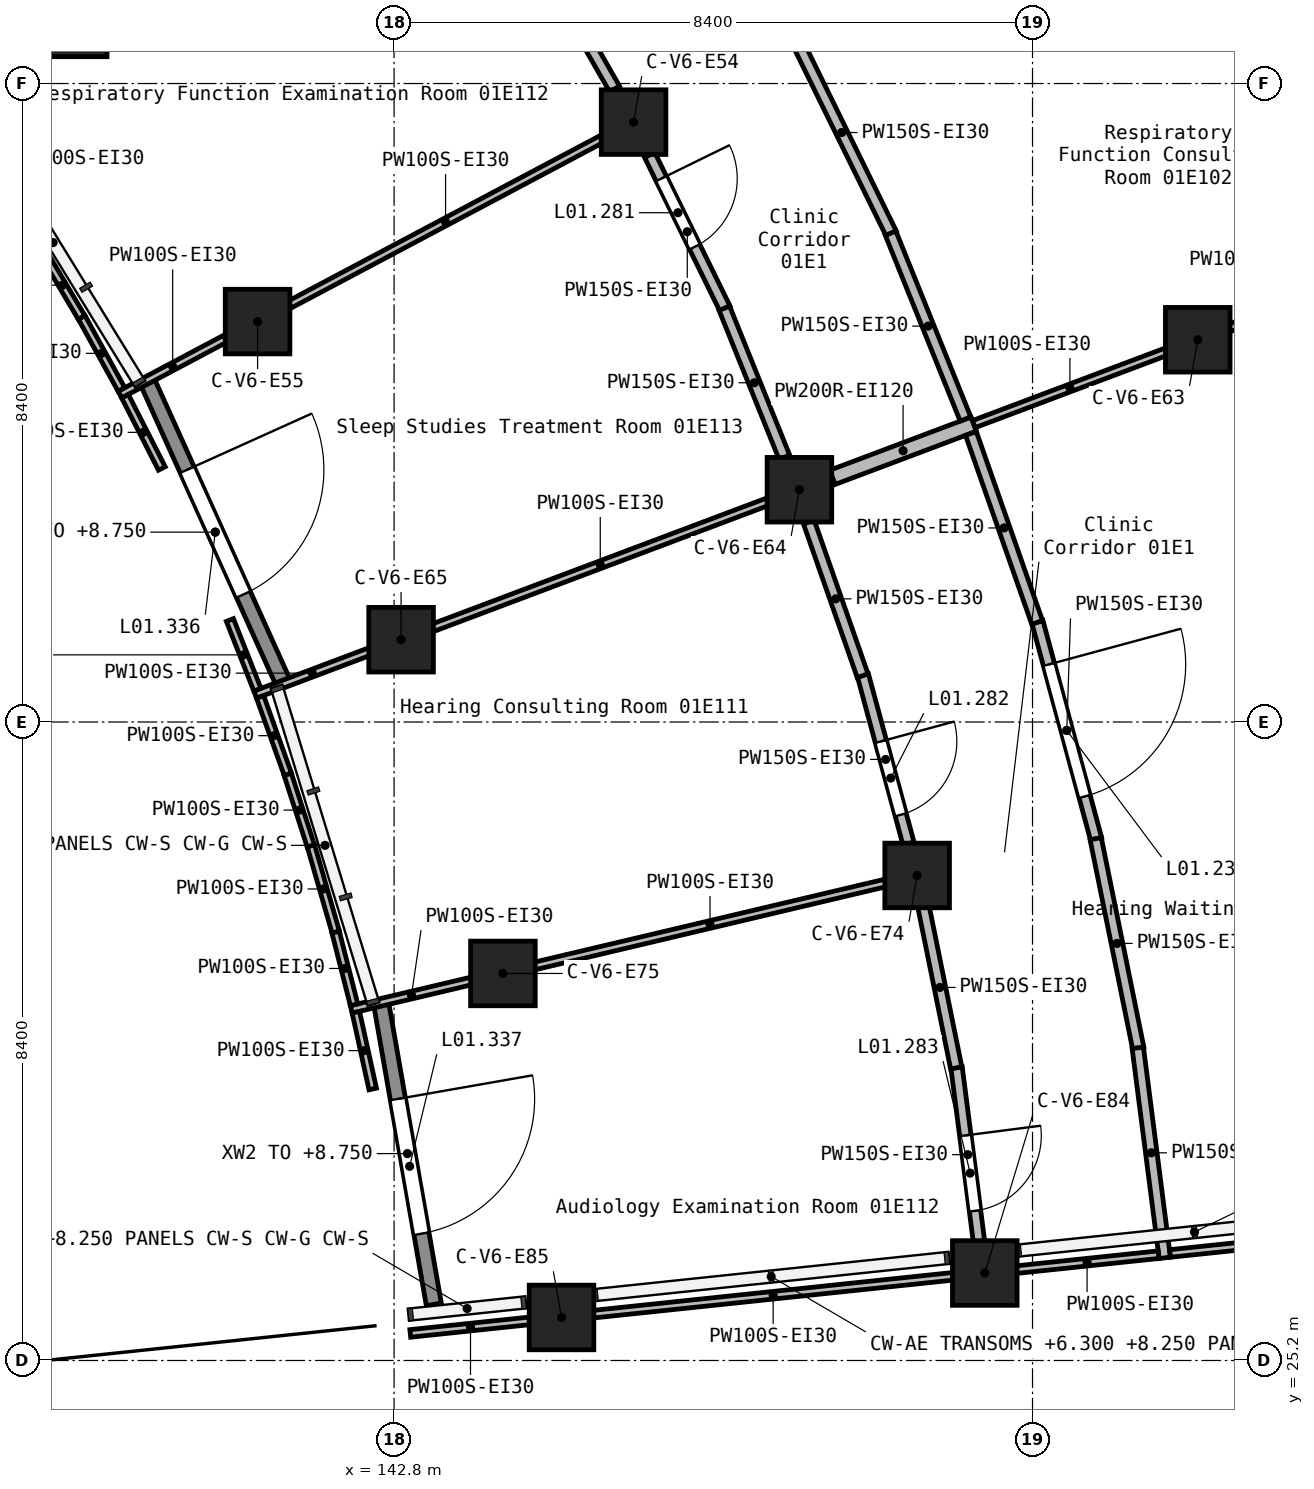
"""IFC4 building model, lengths in metres.
Left out: names, types, materials, properties, quantities, classifications, styles, units other than length and angle.
Written with IfcOpenShell. Run it as: python <this file> out.ifc"""

import sys

from ifc_helpers import new_model, si_unit, direction, frame, frame_2d, origin, origin_2d, place, context, subcontext, project, spatial, rectangle, extrude, element, fill, save


model = new_model("IFC4")
c1 = context("Model", 3, precision=1e-05, world=origin(), true_north=direction((0.0, 1.0)))
c2 = subcontext(c1, "Body", "Model", "MODEL_VIEW")
j1 = project(units=[si_unit("LENGTHUNIT", "METRE"), si_unit("PLANEANGLEUNIT", "RADIAN")], contexts=[c1])
p1 = place(None, origin())
s1 = spatial("IfcSite", under=j1, at=p1, CompositionType="ELEMENT")
p2 = place(p1, origin())
s2 = spatial("IfcBuilding", under=s1, at=p2, CompositionType="ELEMENT")
p3 = place(p2, frame((0.0, 0.0, 5.4)))
s3 = spatial("IfcBuildingStorey", under=s2, at=p3, CompositionType="ELEMENT", Elevation=5.4)
for number, where, z_axis, x_axis in (
    (1, (138.598, 42.778, 0.0), (0.0, 0.0, 1.0), (1.0, 0.0, 0.0)),
    (2, (141.004, 38.868, 0.0), (0.0, 0.0, 1.0), (1.0, 0.0, 0.0)),
    (3, (142.892, 34.683, 0.0), (0.0, 0.0, 1.0), (1.0, 0.0, 0.0)),
    (4, (144.232, 30.292, 0.0), (0.0, 0.0, 1.0), (1.0, 0.0, 0.0)),
    (5, (145.003, 25.766, 0.0), (0.0, 0.0, 1.0), (1.0, 0.0, 0.0)),
    (6, (145.951, 41.492, 0.0), (0.0, 0.0, 1.0), (1.0, 0.0, 0.0)),
    (7, (148.133, 36.656, 0.0), (0.0, 0.0, 1.0), (1.0, 0.0, 0.0)),
    (8, (149.682, 31.581, 0.0), (0.0, 0.0, 1.0), (1.0, 0.0, 0.0)),
    (9, (150.572, 26.351, 0.0), (0.0, 0.0, 1.0), (1.0, 0.0, 0.0)),
    (10, (153.374, 38.629, 0.0), (0.0, 0.0, 1.0), (1.0, 0.0, 0.0)),
):
    element("IfcColumn", number, at=place(p3, frame(where, z_axis=z_axis, x_axis=x_axis)), inside=s3, PredefinedType="COLUMN", context=c2, shape_type="SweptSolid", body=[
        extrude(rectangle(XDim=0.85, YDim=0.85, at=origin_2d()), origin(), (0.0, 0.0, 1.0), 4.5),
    ])
p4 = place(p3, frame((139.549, 38.089, 0.0), z_axis=(0.0, 0.0, 1.0), x_axis=(0.411110484999, -0.911585524854, 0.0)))
e11 = element("IfcWall", 11, at=p4, inside=s3, PredefinedType="STANDARD", context=c2, shape_type="SweptSolid", body=[
    extrude(rectangle(XDim=4.368, YDim=0.2, at=frame_2d((2.184, 0.0))), origin(), (0.0, 0.0, 1.0), 3.35),
])
p5 = place(p4, frame((1.284, 0.0, 0.0)))
e12 = element("IfcOpeningElement", 12, at=p5, cuts=e11, PredefinedType="OPENING", context=c2, shape_type="SweptSolid", body=[
    extrude(rectangle(XDim=1.8, YDim=2.4, at=frame_2d((0.9, 1.2))), frame((0.0, 0.11, 0.0), z_axis=(0.0, -1.0, 0.0), x_axis=(1.0, 0.0, 0.0)), (0.0, 0.0, 1.0), 0.22),
])
p6 = place(p3, frame((142.628, 29.906, 0.0), z_axis=(0.0, 0.0, 1.0), x_axis=(0.172540568976, -0.985002412209, 0.0)))
e13 = element("IfcWall", 13, at=p6, inside=s3, PredefinedType="STANDARD", context=c2, shape_type="SweptSolid", body=[
    extrude(rectangle(XDim=4.028, YDim=0.2, at=frame_2d((2.014, 0.0))), origin(), (0.0, 0.0, 1.0), 3.35),
])
p7 = place(p6, frame((1.284, 0.0, 0.0)))
e14 = element("IfcOpeningElement", 14, at=p7, cuts=e13, PredefinedType="OPENING", context=c2, shape_type="SweptSolid", body=[
    extrude(rectangle(XDim=1.8, YDim=2.4, at=frame_2d((0.9, 1.2))), frame((0.0, 0.11, 0.0), z_axis=(0.0, -1.0, 0.0), x_axis=(1.0, 0.0, 0.0)), (0.0, 0.0, 1.0), 0.22),
])
p8 = place(p3, frame((148.567, 36.819, 0.0), z_axis=(0.0, 0.0, 1.0), x_axis=(0.935934561344, 0.352173958268, 0.0)))
e15 = element("IfcWall", 15, at=p8, inside=s3, PredefinedType="SOLIDWALL", context=c2, shape_type="SweptSolid", body=[
    extrude(rectangle(XDim=1.986, YDim=0.2, at=frame_2d((0.993, 0.0))), origin(), (0.0, 0.0, 1.0), 4.15),
])
p9 = place(p3, frame((148.038, 42.683, 0.0), z_axis=(0.0, 0.0, 1.0), x_axis=(0.440200278942, -0.897899612663, 0.0)))
e16 = element("IfcWall", 16, at=p9, inside=s3, PredefinedType="PARTITIONING", context=c2, shape_type="SweptSolid", body=[
    extrude(rectangle(XDim=2.958, YDim=0.15, at=frame_2d((1.479, 0.0))), origin(), (0.0, 0.0, 1.0), 4.15),
])
p10 = place(p3, frame((151.264, 34.917, 0.0), z_axis=(0.0, 0.0, 1.0), x_axis=(0.261098222271, -0.965312238774, 0.0)))
e17 = element("IfcWall", 17, at=p10, inside=s3, PredefinedType="PARTITIONING", context=c2, shape_type="SweptSolid", body=[
    extrude(rectangle(XDim=2.958, YDim=0.15, at=frame_2d((1.479, 0.0))), origin(), (0.0, 0.0, 1.0), 4.15),
])
p11 = place(p10, frame((0.579, 0.0, 0.0)))
e18 = element("IfcOpeningElement", 18, at=p11, cuts=e17, PredefinedType="OPENING", context=c2, shape_type="SweptSolid", body=[
    extrude(rectangle(XDim=1.8, YDim=2.1, at=frame_2d((0.9, 1.05))), frame((0.0, 0.085, 0.0), z_axis=(0.0, -1.0, 0.0), x_axis=(1.0, 0.0, 0.0)), (0.0, 0.0, 1.0), 0.17),
])
p12 = place(p3, frame((152.031, 32.065, 0.0), z_axis=(0.0, 0.0, 1.0), x_axis=(0.199104225367, -0.979978319883, 0.0)))
e19 = element("IfcWall", 19, at=p12, inside=s3, PredefinedType="PARTITIONING", context=c2, shape_type="SweptSolid", body=[
    extrude(rectangle(XDim=2.812, YDim=0.15, at=frame_2d((1.406, 0.0))), origin(), (0.0, 0.0, 1.0), 4.15),
])
p13 = place(p3, frame((149.333, 40.03, 0.0), z_axis=(0.0, 0.0, 1.0), x_axis=(0.373865497673, -0.927482932269, 0.0)))
e20 = element("IfcWall", 20, at=p13, inside=s3, PredefinedType="PARTITIONING", context=c2, shape_type="SweptSolid", body=[
    extrude(rectangle(XDim=2.635, YDim=0.15, at=frame_2d((1.317, 0.0))), origin(), (0.0, 0.0, 1.0), 4.15),
])
p14 = place(p3, frame((152.585, 29.314, 0.0), z_axis=(0.0, 0.0, 1.0), x_axis=(0.127582082385, -0.991828015462, 0.0)))
e21 = element("IfcWall", 21, at=p14, inside=s3, PredefinedType="PARTITIONING", context=c2, shape_type="SweptSolid", body=[
    extrude(rectangle(XDim=2.786, YDim=0.15, at=frame_2d((1.393, 0.0))), origin(), (0.0, 0.0, 1.0), 4.15),
])
p15 = place(p3, frame((150.39, 37.396, 0.0), z_axis=(0.0, 0.0, 1.0), x_axis=(0.330759074405, -0.943715229663, 0.0)))
e22 = element("IfcWall", 22, at=p15, inside=s3, PredefinedType="PARTITIONING", context=c2, shape_type="SweptSolid", body=[
    extrude(rectangle(XDim=2.634, YDim=0.15, at=frame_2d((1.317, 0.0))), origin(), (0.0, 0.0, 1.0), 4.15),
])
p16 = place(p3, frame((146.163, 41.06, 0.0), z_axis=(0.0, 0.0, 1.0), x_axis=(0.439946079235, -0.898024190858, 0.0)))
e23 = element("IfcWall", 23, at=p16, inside=s3, PredefinedType="PARTITIONING", context=c2, shape_type="SweptSolid", body=[
    extrude(rectangle(XDim=2.249, YDim=0.15, at=frame_2d((1.124, 0.0))), origin(), (0.0, 0.0, 1.0), 4.15),
])
p17 = place(p16, frame((0.346, 0.0, 0.0)))
e24 = element("IfcOpeningElement", 24, at=p17, cuts=e23, PredefinedType="OPENING", context=c2, shape_type="SweptSolid", body=[
    extrude(rectangle(XDim=1.0, YDim=2.1, at=frame_2d((0.5, 1.05))), frame((0.0, 0.085, 0.0), z_axis=(0.0, -1.0, 0.0), x_axis=(1.0, 0.0, 0.0)), (0.0, 0.0, 1.0), 0.17),
])
p18 = place(p3, frame((148.969, 34.215, 0.0), z_axis=(0.0, 0.0, 1.0), x_axis=(0.26138863195, -0.965233641709, 0.0)))
e25 = element("IfcWall", 25, at=p18, inside=s3, PredefinedType="PARTITIONING", context=c2, shape_type="SweptSolid", body=[
    extrude(rectangle(XDim=2.295, YDim=0.15, at=frame_2d((1.147, 0.0))), origin(), (0.0, 0.0, 1.0), 4.15),
])
p19 = place(p18, frame((0.902, 0.0, 0.0)))
e26 = element("IfcOpeningElement", 26, at=p19, cuts=e25, PredefinedType="OPENING", context=c2, shape_type="SweptSolid", body=[
    extrude(rectangle(XDim=1.0, YDim=2.1, at=frame_2d((0.5, 1.05))), frame((0.0, 0.085, 0.0), z_axis=(0.0, -1.0, 0.0), x_axis=(1.0, 0.0, 0.0)), (0.0, 0.0, 1.0), 0.17),
])
p20 = place(p3, frame((150.2, 29.055, 0.0), z_axis=(0.0, 0.0, 1.0), x_axis=(0.127773812466, -0.991803333755, 0.0)))
e27 = element("IfcWall", 27, at=p20, inside=s3, PredefinedType="PARTITIONING", context=c2, shape_type="SweptSolid", body=[
    extrude(rectangle(XDim=2.314, YDim=0.15, at=frame_2d((1.157, 0.0))), origin(), (0.0, 0.0, 1.0), 4.15),
])
p21 = place(p20, frame((0.902, 0.0, 0.0)))
e28 = element("IfcOpeningElement", 28, at=p21, cuts=e27, PredefinedType="OPENING", context=c2, shape_type="SweptSolid", body=[
    extrude(rectangle(XDim=1.0, YDim=2.1, at=frame_2d((0.5, 1.05))), frame((0.0, 0.085, 0.0), z_axis=(0.0, -1.0, 0.0), x_axis=(1.0, 0.0, 0.0)), (0.0, 0.0, 1.0), 0.17),
])
p22 = place(p3, frame((144.668, 43.734, 0.0), z_axis=(0.0, 0.0, 1.0), x_axis=(0.496694973164, -0.867925171679, 0.0)))
e29 = element("IfcWall", 29, at=p22, inside=s3, PredefinedType="PARTITIONING", context=c2, shape_type="SweptSolid", body=[
    extrude(rectangle(XDim=2.08, YDim=0.15, at=frame_2d((1.04, 0.0))), origin(), (0.0, 0.0, 1.0), 4.15),
])
p23 = place(p3, frame((147.145, 39.043, 0.0), z_axis=(0.0, 0.0, 1.0), x_axis=(0.373899406404, -0.927469263043, 0.0)))
e30 = element("IfcWall", 30, at=p23, inside=s3, PredefinedType="PARTITIONING", context=c2, shape_type="SweptSolid", body=[
    extrude(rectangle(XDim=2.113, YDim=0.15, at=frame_2d((1.057, 0.0))), origin(), (0.0, 0.0, 1.0), 4.15),
])
p24 = place(p3, frame((148.257, 36.232, 0.0), z_axis=(0.0, 0.0, 1.0), x_axis=(0.330477279651, -0.943813947574, 0.0)))
e31 = element("IfcWall", 31, at=p24, inside=s3, PredefinedType="PARTITIONING", context=c2, shape_type="SweptSolid", body=[
    extrude(rectangle(XDim=2.143, YDim=0.15, at=frame_2d((1.072, 0.0))), origin(), (0.0, 0.0, 1.0), 4.15),
])
p25 = place(p3, frame((149.766, 31.167, 0.0), z_axis=(0.0, 0.0, 1.0), x_axis=(0.199027700979, -0.97999386439, 0.0)))
e32 = element("IfcWall", 32, at=p25, inside=s3, PredefinedType="PARTITIONING", context=c2, shape_type="SweptSolid", body=[
    extrude(rectangle(XDim=2.16, YDim=0.15, at=frame_2d((1.08, 0.0))), origin(), (0.0, 0.0, 1.0), 4.15),
])
p26 = place(p3, frame((153.878, 43.53, 0.0), z_axis=(0.0, 0.0, 1.0), x_axis=(0.421455751704, -0.906848967224, 0.0)))
e33 = element("IfcWall", 33, at=p26, inside=s3, PredefinedType="PARTITIONING", context=c2, shape_type="SweptSolid", body=[
    extrude(rectangle(XDim=1.562, YDim=0.15, at=frame_2d((0.781, 0.0))), origin(), (0.0, 0.0, 1.0), 4.15),
])
p27 = place(p3, frame((142.237, 29.82, 0.0), z_axis=(0.0, 0.0, 1.0), x_axis=(0.973152848226, 0.230159800984, 0.0)))
e34 = element("IfcWall", 34, at=p27, inside=s3, PredefinedType="PARTITIONING", context=c2, shape_type="SweptSolid", body=[
    extrude(rectangle(XDim=1.627, YDim=0.1, at=frame_2d((0.813, 0.0))), origin(), (0.0, 0.0, 1.0), 4.15),
])
p28 = place(p3, frame((144.643, 30.389, 0.0), z_axis=(0.0, 0.0, 1.0), x_axis=(0.973139038387, 0.230218183398, 0.0)))
e35 = element("IfcWall", 35, at=p28, inside=s3, PredefinedType="PARTITIONING", context=c2, shape_type="SweptSolid", body=[
    extrude(rectangle(XDim=4.755, YDim=0.1, at=frame_2d((2.377, 0.0))), origin(), (0.0, 0.0, 1.0), 4.15),
])
p29 = place(p3, frame((139.193, 37.908, 0.0), z_axis=(0.0, 0.0, 1.0), x_axis=(0.883481589726, 0.468465879884, 0.0)))
e36 = element("IfcWall", 36, at=p29, inside=s3, PredefinedType="PARTITIONING", context=c2, shape_type="SweptSolid", body=[
    extrude(rectangle(XDim=1.571, YDim=0.1, at=frame_2d((0.786, 0.0))), origin(), (0.0, 0.0, 1.0), 4.15),
])
p30 = place(p3, frame((141.427, 39.093, 0.0), z_axis=(0.0, 0.0, 1.0), x_axis=(0.88344099274, 0.46854243388, 0.0)))
e37 = element("IfcWall", 37, at=p30, inside=s3, PredefinedType="PARTITIONING", context=c2, shape_type="SweptSolid", body=[
    extrude(rectangle(XDim=4.642, YDim=0.1, at=frame_2d((2.321, 0.0))), origin(), (0.0, 0.0, 1.0), 4.15),
])
p31 = place(p3, frame((143.013, 25.556, 0.0), z_axis=(0.0, 0.0, 1.0), x_axis=(0.994495375694, 0.104780473964, 0.0)))
e38 = element("IfcWall", 38, at=p31, inside=s3, PredefinedType="PARTITIONING", context=c2, shape_type="SweptSolid", body=[
    extrude(rectangle(XDim=1.594, YDim=0.1, at=frame_2d((0.797, 0.0))), origin(), (0.0, 0.0, 1.0), 4.15),
])
p32 = place(p3, frame((145.408, 25.808, 0.0), z_axis=(0.0, 0.0, 1.0), x_axis=(0.994509645665, 0.104644945786, 0.0)))
e39 = element("IfcWall", 39, at=p32, inside=s3, PredefinedType="PARTITIONING", context=c2, shape_type="SweptSolid", body=[
    extrude(rectangle(XDim=4.785, YDim=0.1, at=frame_2d((2.393, 0.0))), origin(), (0.0, 0.0, 1.0), 4.15),
])
p33 = place(p3, frame((140.973, 33.96, 0.0), z_axis=(0.0, 0.0, 1.0), x_axis=(0.935890679388, 0.35229055655, 0.0)))
e40 = element("IfcWall", 40, at=p33, inside=s3, PredefinedType="PARTITIONING", context=c2, shape_type="SweptSolid", body=[
    extrude(rectangle(XDim=1.604, YDim=0.1, at=frame_2d((0.802, 0.0))), origin(), (0.0, 0.0, 1.0), 4.15),
])
p34 = place(p3, frame((143.309, 34.84, 0.0), z_axis=(0.0, 0.0, 1.0), x_axis=(0.935891610639, 0.352288082591, 0.0)))
e41 = element("IfcWall", 41, at=p34, inside=s3, PredefinedType="PARTITIONING", context=c2, shape_type="SweptSolid", body=[
    extrude(rectangle(XDim=4.708, YDim=0.1, at=frame_2d((2.354, 0.0))), origin(), (0.0, 0.0, 1.0), 4.15),
])
p35 = place(p3, frame((150.427, 37.519, 0.0), z_axis=(0.0, 0.0, 1.0), x_axis=(0.935894141782, 0.352281358262, 0.0)))
e42 = element("IfcWall", 42, at=p35, inside=s3, PredefinedType="PARTITIONING", context=c2, shape_type="SweptSolid", body=[
    extrude(rectangle(XDim=2.703, YDim=0.1, at=frame_2d((1.352, 0.0))), origin(), (0.0, 0.0, 1.0), 4.15),
])
p36 = place(p3, frame((153.791, 38.785, 0.0), z_axis=(0.0, 0.0, 1.0), x_axis=(0.935884008534, 0.35230827775, 0.0)))
e43 = element("IfcWall", 43, at=p36, inside=s3, PredefinedType="PARTITIONING", context=c2, shape_type="SweptSolid", body=[
    extrude(rectangle(XDim=1.874, YDim=0.1, at=frame_2d((0.937, 0.0))), origin(), (0.0, 0.0, 1.0), 4.15),
])
p37 = place(p3, frame((150.977, 26.394, 0.0), z_axis=(0.0, 0.0, 1.0), x_axis=(0.99450757419, 0.104664630505, 0.0)))
e44 = element("IfcWall", 44, at=p37, inside=s3, PredefinedType="PARTITIONING", context=c2, shape_type="SweptSolid", body=[
    extrude(rectangle(XDim=1.892, YDim=0.1, at=frame_2d((0.946, 0.0))), origin(), (0.0, 0.0, 1.0), 4.15),
])
p38 = place(p3, frame((139.26, 37.886, 0.0), z_axis=(0.0, 0.0, 1.0), x_axis=(0.454251585092, -0.890873446367, 0.0)))
e45 = element("IfcWall", 45, at=p38, inside=s3, PredefinedType="PARTITIONING", context=c2, shape_type="SweptSolid", body=[
    extrude(rectangle(XDim=1.066, YDim=0.1, at=frame_2d((0.533, 0.0))), origin(), (0.0, 0.0, 1.0), 4.15),
])
p39 = place(p3, frame((141.705, 31.973, 0.0), z_axis=(0.0, 0.0, 1.0), x_axis=(0.276407300439, -0.961040584088, 0.0)))
e46 = element("IfcWall", 46, at=p39, inside=s3, PredefinedType="PARTITIONING", context=c2, shape_type="SweptSolid", body=[
    extrude(rectangle(XDim=1.185, YDim=0.1, at=frame_2d((0.593, 0.0))), origin(), (0.0, 0.0, 1.0), 4.15),
])
p40 = place(p3, frame((138.689, 38.925, 0.0), z_axis=(0.0, 0.0, 1.0), x_axis=(0.482886802116, -0.875682782942, 0.0)))
e47 = element("IfcWall", 47, at=p40, inside=s3, PredefinedType="PARTITIONING", context=c2, shape_type="SweptSolid", body=[
    extrude(rectangle(XDim=1.084, YDim=0.1, at=frame_2d((0.542, 0.0))), origin(), (0.0, 0.0, 1.0), 4.15),
])
p41 = place(p3, frame((140.64, 34.942, 0.0), z_axis=(0.0, 0.0, 1.0), x_axis=(0.366901413892, -0.93025983063, 0.0)))
e48 = element("IfcWall", 48, at=p41, inside=s3, PredefinedType="PARTITIONING", context=c2, shape_type="SweptSolid", body=[
    extrude(rectangle(XDim=0.986, YDim=0.1, at=frame_2d((0.493, 0.0))), origin(), (0.0, 0.0, 1.0), 4.15),
])
p42 = place(p3, frame((141.037, 33.93, 0.0), z_axis=(0.0, 0.0, 1.0), x_axis=(0.337434932816, -0.941348854631, 0.0)))
e49 = element("IfcWall", 49, at=p42, inside=s3, PredefinedType="PARTITIONING", context=c2, shape_type="SweptSolid", body=[
    extrude(rectangle(XDim=1.084, YDim=0.1, at=frame_2d((0.542, 0.0))), origin(), (0.0, 0.0, 1.0), 4.15),
])
p43 = place(p3, frame((141.401, 32.911, 0.0), z_axis=(0.0, 0.0, 1.0), x_axis=(0.307089469025, -0.951680649175, 0.0)))
e50 = element("IfcWall", 50, at=p43, inside=s3, PredefinedType="PARTITIONING", context=c2, shape_type="SweptSolid", body=[
    extrude(rectangle(XDim=0.987, YDim=0.1, at=frame_2d((0.494, 0.0))), origin(), (0.0, 0.0, 1.0), 4.15),
])
p44 = place(p3, frame((142.031, 30.835, 0.0), z_axis=(0.0, 0.0, 1.0), x_axis=(0.246091023995, -0.969246721898, 0.0)))
e51 = element("IfcWall", 51, at=p44, inside=s3, PredefinedType="PARTITIONING", context=c2, shape_type="SweptSolid", body=[
    extrude(rectangle(XDim=0.985, YDim=0.1, at=frame_2d((0.493, 0.0))), origin(), (0.0, 0.0, 1.0), 4.15),
])
p45 = place(p3, frame((142.297, 29.781, 0.0), z_axis=(0.0, 0.0, 1.0), x_axis=(0.214929366895, -0.976629595725, 0.0)))
e52 = element("IfcWall", 52, at=p45, inside=s3, PredefinedType="PARTITIONING", context=c2, shape_type="SweptSolid", body=[
    extrude(rectangle(XDim=1.034, YDim=0.1, at=frame_2d((0.517, 0.0))), origin(), (0.0, 0.0, 1.0), 4.15),
])
p46 = place(p3, frame((138.185, 39.771, 0.0), z_axis=(0.0, 0.0, 1.0), x_axis=(0.51019570921, -0.860058334245, 0.0)))
e53 = element("IfcWall", 53, at=p46, inside=s3, PredefinedType="PARTITIONING", context=c2, shape_type="SweptSolid", body=[
    extrude(rectangle(XDim=0.987, YDim=0.1, at=frame_2d((0.493, 0.0))), origin(), (0.0, 0.0, 1.0), 4.15),
])
p47 = place(p3, frame((153.009, 26.608, 0.0), z_axis=(0.0, 0.0, 1.0), x_axis=(0.99452300046, 0.104517948486, 0.0)))
e54 = element("IfcWall", 54, at=p47, inside=s3, PredefinedType="PARTITIONING", context=c2, shape_type="SweptSolid", body=[
    extrude(rectangle(XDim=2.742, YDim=0.1, at=frame_2d((1.371, 0.0))), origin(), (0.0, 0.0, 1.0), 4.15),
])
p48 = place(p5, origin())
e55 = element("IfcDoor", 55, at=p48, inside=s3, OperationType="SINGLE_SWING_LEFT", PredefinedType="DOOR", context=c2, shape_type="SweptSolid", body=[
    extrude(rectangle(XDim=1.8, YDim=2.4, at=frame_2d((0.9, 1.2))), frame((0.0, 0.025, 0.0), z_axis=(0.0, -1.0, 0.0), x_axis=(1.0, 0.0, 0.0)), (0.0, 0.0, 1.0), 0.05),
])
fill(e12, e55)
p49 = place(p7, origin())
e56 = element("IfcDoor", 56, at=p49, inside=s3, OperationType="SINGLE_SWING_LEFT", PredefinedType="DOOR", context=c2, shape_type="SweptSolid", body=[
    extrude(rectangle(XDim=1.8, YDim=2.4, at=frame_2d((0.9, 1.2))), frame((0.0, 0.025, 0.0), z_axis=(0.0, -1.0, 0.0), x_axis=(1.0, 0.0, 0.0)), (0.0, 0.0, 1.0), 0.05),
])
fill(e14, e56)
p50 = place(p11, frame((1.8, 0.0, 0.0), z_axis=(0.0, 0.0, 1.0), x_axis=(-1.0, 0.0, 0.0)))
e57 = element("IfcDoor", 57, at=p50, inside=s3, OperationType="DOUBLE_DOOR_SINGLE_SWING", PredefinedType="DOOR", context=c2, shape_type="SweptSolid", body=[
    extrude(rectangle(XDim=1.8, YDim=2.1, at=frame_2d((0.9, 1.05))), frame((0.0, 0.025, 0.0), z_axis=(0.0, -1.0, 0.0), x_axis=(1.0, 0.0, 0.0)), (0.0, 0.0, 1.0), 0.05),
])
fill(e18, e57)
p51 = place(p17, frame((1.0, 0.0, 0.0), z_axis=(0.0, 0.0, 1.0), x_axis=(-1.0, 0.0, 0.0)))
e58 = element("IfcDoor", 58, at=p51, inside=s3, OperationType="SINGLE_SWING_RIGHT", PredefinedType="DOOR", context=c2, shape_type="SweptSolid", body=[
    extrude(rectangle(XDim=1.0, YDim=2.1, at=frame_2d((0.5, 1.05))), frame((0.0, 0.025, 0.0), z_axis=(0.0, -1.0, 0.0), x_axis=(1.0, 0.0, 0.0)), (0.0, 0.0, 1.0), 0.05),
])
fill(e24, e58)
p52 = place(p19, frame((1.0, 0.0, 0.0), z_axis=(0.0, 0.0, 1.0), x_axis=(-1.0, 0.0, 0.0)))
e59 = element("IfcDoor", 59, at=p52, inside=s3, OperationType="SINGLE_SWING_LEFT", PredefinedType="DOOR", context=c2, shape_type="SweptSolid", body=[
    extrude(rectangle(XDim=1.0, YDim=2.1, at=frame_2d((0.5, 1.05))), frame((0.0, 0.025, 0.0), z_axis=(0.0, -1.0, 0.0), x_axis=(1.0, 0.0, 0.0)), (0.0, 0.0, 1.0), 0.05),
])
fill(e26, e59)
p53 = place(p21, frame((1.0, 0.0, 0.0), z_axis=(0.0, 0.0, 1.0), x_axis=(-1.0, 0.0, 0.0)))
e60 = element("IfcDoor", 60, at=p53, inside=s3, OperationType="SINGLE_SWING_LEFT", PredefinedType="DOOR", context=c2, shape_type="SweptSolid", body=[
    extrude(rectangle(XDim=1.0, YDim=2.1, at=frame_2d((0.5, 1.05))), frame((0.0, 0.025, 0.0), z_axis=(0.0, -1.0, 0.0), x_axis=(1.0, 0.0, 0.0)), (0.0, 0.0, 1.0), 0.05),
])
fill(e28, e60)
save(model, sys.argv[1])
